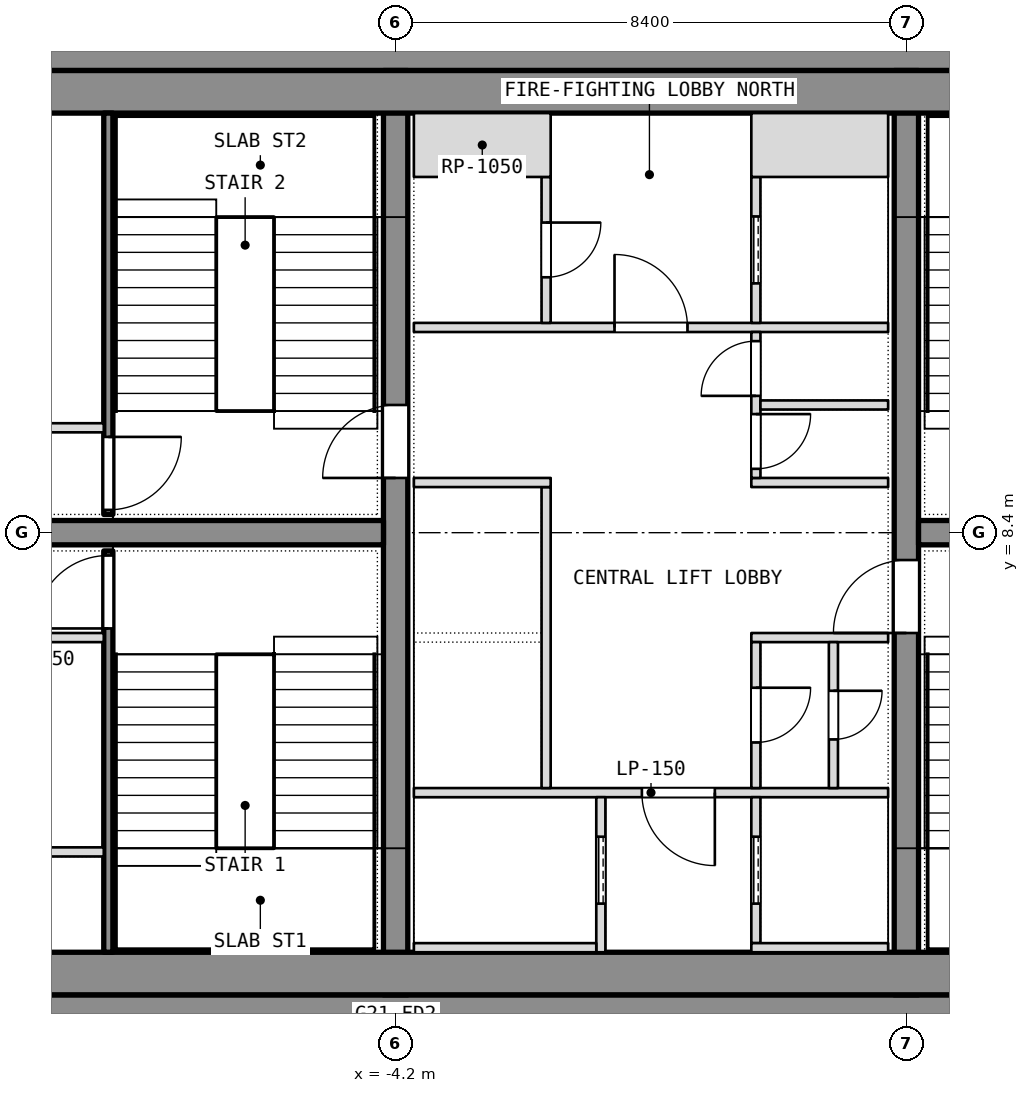
"""IFC4 building model, lengths in metres.
Left out: names, types, materials, properties, quantities, classifications, styles, units other than length and angle.
Written with IfcOpenShell. Run it as: python <this file> out.ifc"""

import sys

from ifc_helpers import new_model, si_unit, direction, frame, frame_2d, origin, place, context, subcontext, project, spatial, rectangle, extrude, element, fill, save


model = new_model("IFC4")
c1 = context("Model", 3, precision=1e-05, world=origin(), true_north=direction((0.0, 1.0)))
c2 = subcontext(c1, "Body", "Model", "MODEL_VIEW")
j1 = project(units=[si_unit("LENGTHUNIT", "METRE"), si_unit("PLANEANGLEUNIT", "RADIAN")], contexts=[c1])
p1 = place(None, origin())
s1 = spatial("IfcSite", under=j1, at=p1, CompositionType="ELEMENT")
p2 = place(p1, origin())
s2 = spatial("IfcBuilding", under=s1, at=p2, CompositionType="ELEMENT")
p3 = place(p2, frame((0.0, 0.0, 241.7)))
s3 = spatial("IfcBuildingStorey", under=s2, at=p3, CompositionType="ELEMENT", Elevation=241.7)
for number, where, z_axis, x_axis in (
    (1, (-11.1, 0.4, 0.0), (0.0, 0.0, 1.0), (1.0, 0.0, 0.0)),
    (2, (-11.1, 16.4, 0.0), (0.0, 0.0, 1.0), (1.0, 0.0, 0.0)),
):
    element("IfcWall", number, at=place(p3, frame(where, z_axis=z_axis, x_axis=x_axis)), inside=s3, PredefinedType="SHEAR", context=c2, shape_type="SweptSolid", body=[
        extrude(rectangle(XDim=22.2, YDim=0.8, at=frame_2d((11.1, 0.0))), origin(), (0.0, 0.0, 1.0), 3.6),
    ])
p4 = place(p3, frame((-4.2, 0.8, 0.0), z_axis=(0.0, 0.0, 1.0), x_axis=(0.0, 1.0, 0.0)))
e3 = element("IfcWall", 3, at=p4, inside=s3, PredefinedType="SHEAR", context=c2, shape_type="SweptSolid", body=[
    extrude(rectangle(XDim=15.2, YDim=0.4, at=frame_2d((7.6, 0.0))), origin(), (0.0, 0.0, 1.0), 3.6),
])
p5 = place(p4, frame((8.5, 0.0, 0.0)))
e4 = element("IfcOpeningElement", 4, at=p5, cuts=e3, PredefinedType="OPENING", context=c2, shape_type="SweptSolid", body=[
    extrude(rectangle(XDim=1.2, YDim=2.1, at=frame_2d((0.6, 1.05))), frame((0.0, 0.2, 0.0), z_axis=(0.0, -1.0, 0.0), x_axis=(1.0, 0.0, 0.0)), (0.0, 0.0, 1.0), 0.4),
])
p6 = place(p3, frame((4.2, 0.8, 0.0), z_axis=(0.0, 0.0, 1.0), x_axis=(0.0, 1.0, 0.0)))
e5 = element("IfcWall", 5, at=p6, inside=s3, PredefinedType="SHEAR", context=c2, shape_type="SweptSolid", body=[
    extrude(rectangle(XDim=15.2, YDim=0.4, at=frame_2d((7.6, 0.0))), origin(), (0.0, 0.0, 1.0), 3.6),
])
p7 = place(p6, frame((5.95, 0.0, 0.0)))
e6 = element("IfcOpeningElement", 6, at=p7, cuts=e5, PredefinedType="OPENING", context=c2, shape_type="SweptSolid", body=[
    extrude(rectangle(XDim=1.2, YDim=2.1, at=frame_2d((0.6, 1.05))), frame((0.0, 0.2, 0.0), z_axis=(0.0, -1.0, 0.0), x_axis=(1.0, 0.0, 0.0)), (0.0, 0.0, 1.0), 0.4),
])
for number, where, z_axis, x_axis in (
    (7, (-11.1, 8.4, 0.0), (0.0, 0.0, 1.0), (1.0, 0.0, 0.0)),
    (8, (4.4, 8.4, 0.0), (0.0, 0.0, 1.0), (1.0, 0.0, 0.0)),
):
    element("IfcWall", number, at=place(p3, frame(where, z_axis=z_axis, x_axis=x_axis)), inside=s3, PredefinedType="SHEAR", context=c2, shape_type="SweptSolid", body=[
        extrude(rectangle(XDim=6.7, YDim=0.4, at=frame_2d((3.35, 0.0))), origin(), (0.0, 0.0, 1.0), 3.6),
    ])
for number, where, z_axis, x_axis in (
    (9, (-11.1, 1.15, 0.0), (0.0, 0.0, 1.0), (1.0, 0.0, 0.0)),
    (10, (-11.1, 15.65, 0.0), (0.0, 0.0, 1.0), (1.0, 0.0, 0.0)),
):
    element("IfcWall", number, at=place(p3, frame(where, z_axis=z_axis, x_axis=x_axis)), inside=s3, PredefinedType="PARTITIONING", context=c2, shape_type="SweptSolid", body=[
        extrude(rectangle(XDim=22.2, YDim=0.7, at=frame_2d((11.1, 0.0))), origin(), (0.0, 0.0, 1.0), 3.34),
    ])
p8 = place(p3, frame((-8.925, 1.5, 0.0), z_axis=(0.0, 0.0, 1.0), x_axis=(0.0, 1.0, 0.0)))
e11 = element("IfcWall", 11, at=p8, inside=s3, PredefinedType="SHEAR", context=c2, shape_type="SweptSolid", body=[
    extrude(rectangle(XDim=6.6, YDim=0.15, at=frame_2d((3.3, 0.0))), origin(), (0.0, 0.0, 1.0), 3.34),
])
p9 = place(p8, frame((5.325, 0.0, 0.0)))
e12 = element("IfcOpeningElement", 12, at=p9, cuts=e11, PredefinedType="OPENING", context=c2, shape_type="SweptSolid", body=[
    extrude(rectangle(XDim=1.2, YDim=2.1, at=frame_2d((0.6, 1.05))), frame((0.0, 0.075, 0.0), z_axis=(0.0, -1.0, 0.0), x_axis=(1.0, 0.0, 0.0)), (0.0, 0.0, 1.0), 0.15),
])
for number, where, z_axis, x_axis in (
    (13, (-11.1, 6.675, 0.0), (0.0, 0.0, 1.0), (1.0, 0.0, 0.0)),
    (14, (-11.1, 3.15, 0.0), (0.0, 0.0, 1.0), (1.0, 0.0, 0.0)),
):
    element("IfcWall", number, at=place(p3, frame(where, z_axis=z_axis, x_axis=x_axis)), inside=s3, PredefinedType="PARTITIONING", context=c2, shape_type="SweptSolid", body=[
        extrude(rectangle(XDim=2.1, YDim=0.15, at=frame_2d((1.05, 0.0))), origin(), (0.0, 0.0, 1.0), 3.34),
    ])
p10 = place(p3, frame((-8.925, 8.7, 0.0), z_axis=(0.0, 0.0, 1.0), x_axis=(0.0, 1.0, 0.0)))
e15 = element("IfcWall", 15, at=p10, inside=s3, PredefinedType="SHEAR", context=c2, shape_type="SweptSolid", body=[
    extrude(rectangle(XDim=6.6, YDim=0.15, at=frame_2d((3.3, 0.0))), origin(), (0.0, 0.0, 1.0), 3.34),
])
p11 = place(p10, frame((0.075, 0.0, 0.0)))
e16 = element("IfcOpeningElement", 16, at=p11, cuts=e15, PredefinedType="OPENING", context=c2, shape_type="SweptSolid", body=[
    extrude(rectangle(XDim=1.2, YDim=2.1, at=frame_2d((0.6, 1.05))), frame((0.0, 0.075, 0.0), z_axis=(0.0, -1.0, 0.0), x_axis=(1.0, 0.0, 0.0)), (0.0, 0.0, 1.0), 0.15),
])
p12 = place(p3, frame((-11.1, 10.125, 0.0), z_axis=(0.0, 0.0, 1.0), x_axis=(1.0, 0.0, 0.0)))
e17 = element("IfcWall", 17, at=p12, inside=s3, PredefinedType="PARTITIONING", context=c2, shape_type="SweptSolid", body=[
    extrude(rectangle(XDim=2.1, YDim=0.15, at=frame_2d((1.05, 0.0))), origin(), (0.0, 0.0, 1.0), 3.34),
])
p13 = place(p3, frame((-3.9, 4.125, 0.0), z_axis=(0.0, 0.0, 1.0), x_axis=(1.0, 0.0, 0.0)))
e18 = element("IfcWall", 18, at=p13, inside=s3, PredefinedType="PARTITIONING", context=c2, shape_type="SweptSolid", body=[
    extrude(rectangle(XDim=7.8, YDim=0.15, at=frame_2d((3.9, 0.0))), origin(), (0.0, 0.0, 1.0), 3.34),
])
p14 = place(p13, frame((3.75, 0.0, 0.0)))
e19 = element("IfcOpeningElement", 19, at=p14, cuts=e18, PredefinedType="OPENING", context=c2, shape_type="SweptSolid", body=[
    extrude(rectangle(XDim=1.2, YDim=2.1, at=frame_2d((0.6, 1.05))), frame((0.0, 0.075, 0.0), z_axis=(0.0, -1.0, 0.0), x_axis=(1.0, 0.0, 0.0)), (0.0, 0.0, 1.0), 0.15),
])
p15 = place(p3, frame((-3.9, 11.775, 0.0), z_axis=(0.0, 0.0, 1.0), x_axis=(1.0, 0.0, 0.0)))
e20 = element("IfcWall", 20, at=p15, inside=s3, PredefinedType="PARTITIONING", context=c2, shape_type="SweptSolid", body=[
    extrude(rectangle(XDim=7.8, YDim=0.15, at=frame_2d((3.9, 0.0))), origin(), (0.0, 0.0, 1.0), 3.34),
])
p16 = place(p15, frame((3.3, 0.0, 0.0)))
e21 = element("IfcOpeningElement", 21, at=p16, cuts=e20, PredefinedType="OPENING", context=c2, shape_type="SweptSolid", body=[
    extrude(rectangle(XDim=1.2, YDim=2.1, at=frame_2d((0.6, 1.05))), frame((0.0, 0.075, 0.0), z_axis=(0.0, -1.0, 0.0), x_axis=(1.0, 0.0, 0.0)), (0.0, 0.0, 1.0), 0.15),
])
p17 = place(p3, frame((-0.825, 1.5, 0.0), z_axis=(0.0, 0.0, 1.0), x_axis=(0.0, 1.0, 0.0)))
e22 = element("IfcWall", 22, at=p17, inside=s3, PredefinedType="SHEAR", context=c2, shape_type="SweptSolid", body=[
    extrude(rectangle(XDim=2.55, YDim=0.15, at=frame_2d((1.275, 0.0))), origin(), (0.0, 0.0, 1.0), 3.6),
])
p18 = place(p17, frame((0.8, 0.0, 0.0)))
e23 = element("IfcOpeningElement", 23, at=p18, cuts=e22, PredefinedType="OPENING", context=c2, shape_type="SweptSolid", body=[
    extrude(rectangle(XDim=1.1, YDim=2.1, at=frame_2d((0.55, 1.05))), frame((0.0, 0.075, 0.0), z_axis=(0.0, -1.0, 0.0), x_axis=(1.0, 0.0, 0.0)), (0.0, 0.0, 1.0), 0.15),
])
p19 = place(p3, frame((-3.9, 1.575, 0.0), z_axis=(0.0, 0.0, 1.0), x_axis=(1.0, 0.0, 0.0)))
e24 = element("IfcWall", 24, at=p19, inside=s3, PredefinedType="SHEAR", context=c2, shape_type="SweptSolid", body=[
    extrude(rectangle(XDim=3.0, YDim=0.15, at=frame_2d((1.5, 0.0))), origin(), (0.0, 0.0, 1.0), 3.6),
])
p20 = place(p3, frame((-1.725, 4.2, 0.0), z_axis=(0.0, 0.0, 1.0), x_axis=(0.0, 1.0, 0.0)))
e25 = element("IfcWall", 25, at=p20, inside=s3, PredefinedType="SHEAR", context=c2, shape_type="SweptSolid", body=[
    extrude(rectangle(XDim=4.95, YDim=0.15, at=frame_2d((2.475, 0.0))), origin(), (0.0, 0.0, 1.0), 3.6),
])
p21 = place(p3, frame((-3.9, 9.225, 0.0), z_axis=(0.0, 0.0, 1.0), x_axis=(1.0, 0.0, 0.0)))
e26 = element("IfcWall", 26, at=p21, inside=s3, PredefinedType="SHEAR", context=c2, shape_type="SweptSolid", body=[
    extrude(rectangle(XDim=2.25, YDim=0.15, at=frame_2d((1.125, 0.0))), origin(), (0.0, 0.0, 1.0), 3.6),
])
p22 = place(p3, frame((-1.725, 11.85, 0.0), z_axis=(0.0, 0.0, 1.0), x_axis=(0.0, 1.0, 0.0)))
e27 = element("IfcWall", 27, at=p22, inside=s3, PredefinedType="PARTITIONING", context=c2, shape_type="SweptSolid", body=[
    extrude(rectangle(XDim=2.4, YDim=0.15, at=frame_2d((1.2, 0.0))), origin(), (0.0, 0.0, 1.0), 3.34),
])
p23 = place(p22, frame((0.75, 0.0, 0.0)))
e28 = element("IfcOpeningElement", 28, at=p23, cuts=e27, PredefinedType="OPENING", context=c2, shape_type="SweptSolid", body=[
    extrude(rectangle(XDim=0.9, YDim=2.1, at=frame_2d((0.45, 1.05))), frame((0.0, 0.075, 0.0), z_axis=(0.0, -1.0, 0.0), x_axis=(1.0, 0.0, 0.0)), (0.0, 0.0, 1.0), 0.15),
])
p24 = place(p3, frame((-3.9, 14.775, 0.0), z_axis=(0.0, 0.0, 1.0), x_axis=(1.0, 0.0, 0.0)))
e29 = element("IfcWall", 29, at=p24, inside=s3, PredefinedType="PARTITIONING", context=c2, shape_type="SweptSolid", body=[
    extrude(rectangle(XDim=2.25, YDim=1.05, at=frame_2d((1.125, 0.0))), origin(), (0.0, 0.0, 1.0), 3.34),
])
p25 = place(p3, frame((1.725, 1.65, 0.0), z_axis=(0.0, 0.0, 1.0), x_axis=(0.0, 1.0, 0.0)))
e30 = element("IfcWall", 30, at=p25, inside=s3, PredefinedType="SHEAR", context=c2, shape_type="SweptSolid", body=[
    extrude(rectangle(XDim=2.4, YDim=0.15, at=frame_2d((1.2, 0.0))), origin(), (0.0, 0.0, 1.0), 3.6),
])
p26 = place(p25, frame((0.65, 0.0, 0.0)))
e31 = element("IfcOpeningElement", 31, at=p26, cuts=e30, PredefinedType="OPENING", context=c2, shape_type="SweptSolid", body=[
    extrude(rectangle(XDim=1.1, YDim=2.1, at=frame_2d((0.55, 1.05))), frame((0.0, 0.075, 0.0), z_axis=(0.0, -1.0, 0.0), x_axis=(1.0, 0.0, 0.0)), (0.0, 0.0, 1.0), 0.15),
])
p27 = place(p3, frame((1.65, 1.575, 0.0), z_axis=(0.0, 0.0, 1.0), x_axis=(1.0, 0.0, 0.0)))
e32 = element("IfcWall", 32, at=p27, inside=s3, PredefinedType="SHEAR", context=c2, shape_type="SweptSolid", body=[
    extrude(rectangle(XDim=2.25, YDim=0.15, at=frame_2d((1.125, 0.0))), origin(), (0.0, 0.0, 1.0), 3.6),
])
p28 = place(p3, frame((1.725, 11.85, 0.0), z_axis=(0.0, 0.0, 1.0), x_axis=(0.0, 1.0, 0.0)))
e33 = element("IfcWall", 33, at=p28, inside=s3, PredefinedType="SHEAR", context=c2, shape_type="SweptSolid", body=[
    extrude(rectangle(XDim=2.4, YDim=0.15, at=frame_2d((1.2, 0.0))), origin(), (0.0, 0.0, 1.0), 3.6),
])
p29 = place(p28, frame((0.65, 0.0, 0.0)))
e34 = element("IfcOpeningElement", 34, at=p29, cuts=e33, PredefinedType="OPENING", context=c2, shape_type="SweptSolid", body=[
    extrude(rectangle(XDim=1.1, YDim=2.1, at=frame_2d((0.55, 1.05))), frame((0.0, 0.075, 0.0), z_axis=(0.0, -1.0, 0.0), x_axis=(1.0, 0.0, 0.0)), (0.0, 0.0, 1.0), 0.15),
])
p30 = place(p3, frame((1.65, 14.775, 0.0), z_axis=(0.0, 0.0, 1.0), x_axis=(1.0, 0.0, 0.0)))
e35 = element("IfcWall", 35, at=p30, inside=s3, PredefinedType="SHEAR", context=c2, shape_type="SweptSolid", body=[
    extrude(rectangle(XDim=2.25, YDim=1.05, at=frame_2d((1.125, 0.0))), origin(), (0.0, 0.0, 1.0), 3.6),
])
for number, where, z_axis, x_axis in (
    (36, (1.65, 6.675, 0.0), (0.0, 0.0, 1.0), (1.0, 0.0, 0.0)),
    (37, (1.65, 9.225, 0.0), (0.0, 0.0, 1.0), (1.0, 0.0, 0.0)),
):
    element("IfcWall", number, at=place(p3, frame(where, z_axis=z_axis, x_axis=x_axis)), inside=s3, PredefinedType="PARTITIONING", context=c2, shape_type="SweptSolid", body=[
        extrude(rectangle(XDim=2.25, YDim=0.15, at=frame_2d((1.125, 0.0))), origin(), (0.0, 0.0, 1.0), 3.34),
    ])
p31 = place(p3, frame((1.725, 4.2, 0.0), z_axis=(0.0, 0.0, 1.0), x_axis=(0.0, 1.0, 0.0)))
e38 = element("IfcWall", 38, at=p31, inside=s3, PredefinedType="PARTITIONING", context=c2, shape_type="SweptSolid", body=[
    extrude(rectangle(XDim=2.4, YDim=0.15, at=frame_2d((1.2, 0.0))), origin(), (0.0, 0.0, 1.0), 3.34),
])
p32 = place(p31, frame((0.75, 0.0, 0.0)))
e39 = element("IfcOpeningElement", 39, at=p32, cuts=e38, PredefinedType="OPENING", context=c2, shape_type="SweptSolid", body=[
    extrude(rectangle(XDim=0.9, YDim=2.1, at=frame_2d((0.45, 1.05))), frame((0.0, 0.075, 0.0), z_axis=(0.0, -1.0, 0.0), x_axis=(1.0, 0.0, 0.0)), (0.0, 0.0, 1.0), 0.15),
])
p33 = place(p3, frame((1.725, 9.3, 0.0), z_axis=(0.0, 0.0, 1.0), x_axis=(0.0, 1.0, 0.0)))
e40 = element("IfcWall", 40, at=p33, inside=s3, PredefinedType="PARTITIONING", context=c2, shape_type="SweptSolid", body=[
    extrude(rectangle(XDim=2.4, YDim=0.15, at=frame_2d((1.2, 0.0))), origin(), (0.0, 0.0, 1.0), 3.34),
])
p34 = place(p33, frame((0.15, 0.0, 0.0)))
e41 = element("IfcOpeningElement", 41, at=p34, cuts=e40, PredefinedType="OPENING", context=c2, shape_type="SweptSolid", body=[
    extrude(rectangle(XDim=0.9, YDim=2.1, at=frame_2d((0.45, 1.05))), frame((0.0, 0.075, 0.0), z_axis=(0.0, -1.0, 0.0), x_axis=(1.0, 0.0, 0.0)), (0.0, 0.0, 1.0), 0.15),
])
p35 = place(p33, frame((1.35, 0.0, 0.0)))
e42 = element("IfcOpeningElement", 42, at=p35, cuts=e40, PredefinedType="OPENING", context=c2, shape_type="SweptSolid", body=[
    extrude(rectangle(XDim=0.9, YDim=2.1, at=frame_2d((0.45, 1.05))), frame((0.0, 0.075, 0.0), z_axis=(0.0, -1.0, 0.0), x_axis=(1.0, 0.0, 0.0)), (0.0, 0.0, 1.0), 0.15),
])
p36 = place(p3, frame((3.0, 4.2, 0.0), z_axis=(0.0, 0.0, 1.0), x_axis=(0.0, 1.0, 0.0)))
e43 = element("IfcWall", 43, at=p36, inside=s3, PredefinedType="PARTITIONING", context=c2, shape_type="SweptSolid", body=[
    extrude(rectangle(XDim=2.4, YDim=0.15, at=frame_2d((1.2, 0.0))), origin(), (0.0, 0.0, 1.0), 3.34),
])
p37 = place(p36, frame((0.8, 0.0, 0.0)))
e44 = element("IfcOpeningElement", 44, at=p37, cuts=e43, PredefinedType="OPENING", context=c2, shape_type="SweptSolid", body=[
    extrude(rectangle(XDim=0.8, YDim=2.1, at=frame_2d((0.4, 1.05))), frame((0.0, 0.075, 0.0), z_axis=(0.0, -1.0, 0.0), x_axis=(1.0, 0.0, 0.0)), (0.0, 0.0, 1.0), 0.15),
])
p38 = place(p3, frame((1.8, 10.5, 0.0), z_axis=(0.0, 0.0, 1.0), x_axis=(1.0, 0.0, 0.0)))
e45 = element("IfcWall", 45, at=p38, inside=s3, PredefinedType="PARTITIONING", context=c2, shape_type="SweptSolid", body=[
    extrude(rectangle(XDim=2.1, YDim=0.15, at=frame_2d((1.05, 0.0))), origin(), (0.0, 0.0, 1.0), 3.34),
])
p39 = place(p9, origin())
e46 = element("IfcDoor", 46, at=p39, inside=s3, OperationType="SINGLE_SWING_LEFT", PredefinedType="DOOR", context=c2, shape_type="SweptSolid", body=[
    extrude(rectangle(XDim=1.2, YDim=2.1, at=frame_2d((0.6, 1.05))), frame((0.0, 0.025, 0.0), z_axis=(0.0, -1.0, 0.0), x_axis=(1.0, 0.0, 0.0)), (0.0, 0.0, 1.0), 0.05),
])
fill(e12, e46)
p40 = place(p11, origin())
e47 = element("IfcDoor", 47, at=p40, inside=s3, OperationType="SINGLE_SWING_LEFT", PredefinedType="DOOR", context=c2, shape_type="SweptSolid", body=[
    extrude(rectangle(XDim=1.2, YDim=2.1, at=frame_2d((0.6, 1.05))), frame((0.0, 0.025, 0.0), z_axis=(0.0, -1.0, 0.0), x_axis=(1.0, 0.0, 0.0)), (0.0, 0.0, 1.0), 0.05),
])
fill(e16, e47)
p41 = place(p32, origin())
e48 = element("IfcDoor", 48, at=p41, inside=s3, OperationType="SINGLE_SWING_LEFT", PredefinedType="DOOR", context=c2, shape_type="SweptSolid", body=[
    extrude(rectangle(XDim=0.9, YDim=2.1, at=frame_2d((0.45, 1.05))), frame((0.0, 0.025, 0.0), z_axis=(0.0, -1.0, 0.0), x_axis=(1.0, 0.0, 0.0)), (0.0, 0.0, 1.0), 0.05),
])
fill(e39, e48)
p42 = place(p37, origin())
e49 = element("IfcDoor", 49, at=p42, inside=s3, OperationType="SINGLE_SWING_LEFT", PredefinedType="DOOR", context=c2, shape_type="SweptSolid", body=[
    extrude(rectangle(XDim=0.8, YDim=2.1, at=frame_2d((0.4, 1.05))), frame((0.0, 0.025, 0.0), z_axis=(0.0, -1.0, 0.0), x_axis=(1.0, 0.0, 0.0)), (0.0, 0.0, 1.0), 0.05),
])
fill(e44, e49)
p43 = place(p34, origin())
e50 = element("IfcDoor", 50, at=p43, inside=s3, OperationType="SINGLE_SWING_LEFT", PredefinedType="DOOR", context=c2, shape_type="SweptSolid", body=[
    extrude(rectangle(XDim=0.9, YDim=2.1, at=frame_2d((0.45, 1.05))), frame((0.0, 0.025, 0.0), z_axis=(0.0, -1.0, 0.0), x_axis=(1.0, 0.0, 0.0)), (0.0, 0.0, 1.0), 0.05),
])
fill(e41, e50)
p44 = place(p35, origin())
e51 = element("IfcDoor", 51, at=p44, inside=s3, OperationType="SINGLE_SWING_LEFT", PredefinedType="DOOR", context=c2, shape_type="SweptSolid", body=[
    extrude(rectangle(XDim=0.9, YDim=2.1, at=frame_2d((0.45, 1.05))), frame((0.0, 0.025, 0.0), z_axis=(0.0, -1.0, 0.0), x_axis=(1.0, 0.0, 0.0)), (0.0, 0.0, 1.0), 0.05),
])
fill(e42, e51)
p45 = place(p18, origin())
e52 = element("IfcDoor", 52, at=p45, inside=s3, OperationType="SLIDING_TO_LEFT", PredefinedType="DOOR", context=c2, shape_type="SweptSolid", body=[
    extrude(rectangle(XDim=1.1, YDim=2.1, at=frame_2d((0.55, 1.05))), frame((0.0, 0.025, 0.0), z_axis=(0.0, -1.0, 0.0), x_axis=(1.0, 0.0, 0.0)), (0.0, 0.0, 1.0), 0.05),
])
fill(e23, e52)
p46 = place(p26, origin())
e53 = element("IfcDoor", 53, at=p46, inside=s3, OperationType="SLIDING_TO_LEFT", PredefinedType="DOOR", context=c2, shape_type="SweptSolid", body=[
    extrude(rectangle(XDim=1.1, YDim=2.1, at=frame_2d((0.55, 1.05))), frame((0.0, 0.025, 0.0), z_axis=(0.0, -1.0, 0.0), x_axis=(1.0, 0.0, 0.0)), (0.0, 0.0, 1.0), 0.05),
])
fill(e31, e53)
p47 = place(p29, origin())
e54 = element("IfcDoor", 54, at=p47, inside=s3, OperationType="SLIDING_TO_LEFT", PredefinedType="DOOR", context=c2, shape_type="SweptSolid", body=[
    extrude(rectangle(XDim=1.1, YDim=2.1, at=frame_2d((0.55, 1.05))), frame((0.0, 0.025, 0.0), z_axis=(0.0, -1.0, 0.0), x_axis=(1.0, 0.0, 0.0)), (0.0, 0.0, 1.0), 0.05),
])
fill(e34, e54)
p48 = place(p14, origin())
e55 = element("IfcDoor", 55, at=p48, inside=s3, OperationType="SINGLE_SWING_LEFT", PredefinedType="DOOR", context=c2, shape_type="SweptSolid", body=[
    extrude(rectangle(XDim=1.2, YDim=2.1, at=frame_2d((0.6, 1.05))), frame((0.0, 0.025, 0.0), z_axis=(0.0, -1.0, 0.0), x_axis=(1.0, 0.0, 0.0)), (0.0, 0.0, 1.0), 0.05),
])
fill(e19, e55)
p49 = place(p16, origin())
e56 = element("IfcDoor", 56, at=p49, inside=s3, OperationType="SINGLE_SWING_LEFT", PredefinedType="DOOR", context=c2, shape_type="SweptSolid", body=[
    extrude(rectangle(XDim=1.2, YDim=2.1, at=frame_2d((0.6, 1.05))), frame((0.0, 0.025, 0.0), z_axis=(0.0, -1.0, 0.0), x_axis=(1.0, 0.0, 0.0)), (0.0, 0.0, 1.0), 0.05),
])
fill(e21, e56)
p50 = place(p23, origin())
e57 = element("IfcDoor", 57, at=p50, inside=s3, OperationType="SINGLE_SWING_LEFT", PredefinedType="DOOR", context=c2, shape_type="SweptSolid", body=[
    extrude(rectangle(XDim=0.9, YDim=2.1, at=frame_2d((0.45, 1.05))), frame((0.0, 0.025, 0.0), z_axis=(0.0, -1.0, 0.0), x_axis=(1.0, 0.0, 0.0)), (0.0, 0.0, 1.0), 0.05),
])
fill(e28, e57)
p51 = place(p5, origin())
e58 = element("IfcDoor", 58, at=p51, inside=s3, OperationType="SINGLE_SWING_LEFT", PredefinedType="DOOR", context=c2, shape_type="SweptSolid", body=[
    extrude(rectangle(XDim=1.2, YDim=2.1, at=frame_2d((0.6, 1.05))), frame((0.0, 0.025, 0.0), z_axis=(0.0, -1.0, 0.0), x_axis=(1.0, 0.0, 0.0)), (0.0, 0.0, 1.0), 0.05),
])
fill(e4, e58)
p52 = place(p7, origin())
e59 = element("IfcDoor", 59, at=p52, inside=s3, OperationType="SINGLE_SWING_LEFT", PredefinedType="DOOR", context=c2, shape_type="SweptSolid", body=[
    extrude(rectangle(XDim=1.2, YDim=2.1, at=frame_2d((0.6, 1.05))), frame((0.0, 0.025, 0.0), z_axis=(0.0, -1.0, 0.0), x_axis=(1.0, 0.0, 0.0)), (0.0, 0.0, 1.0), 0.05),
])
fill(e6, e59)
save(model, sys.argv[1])
